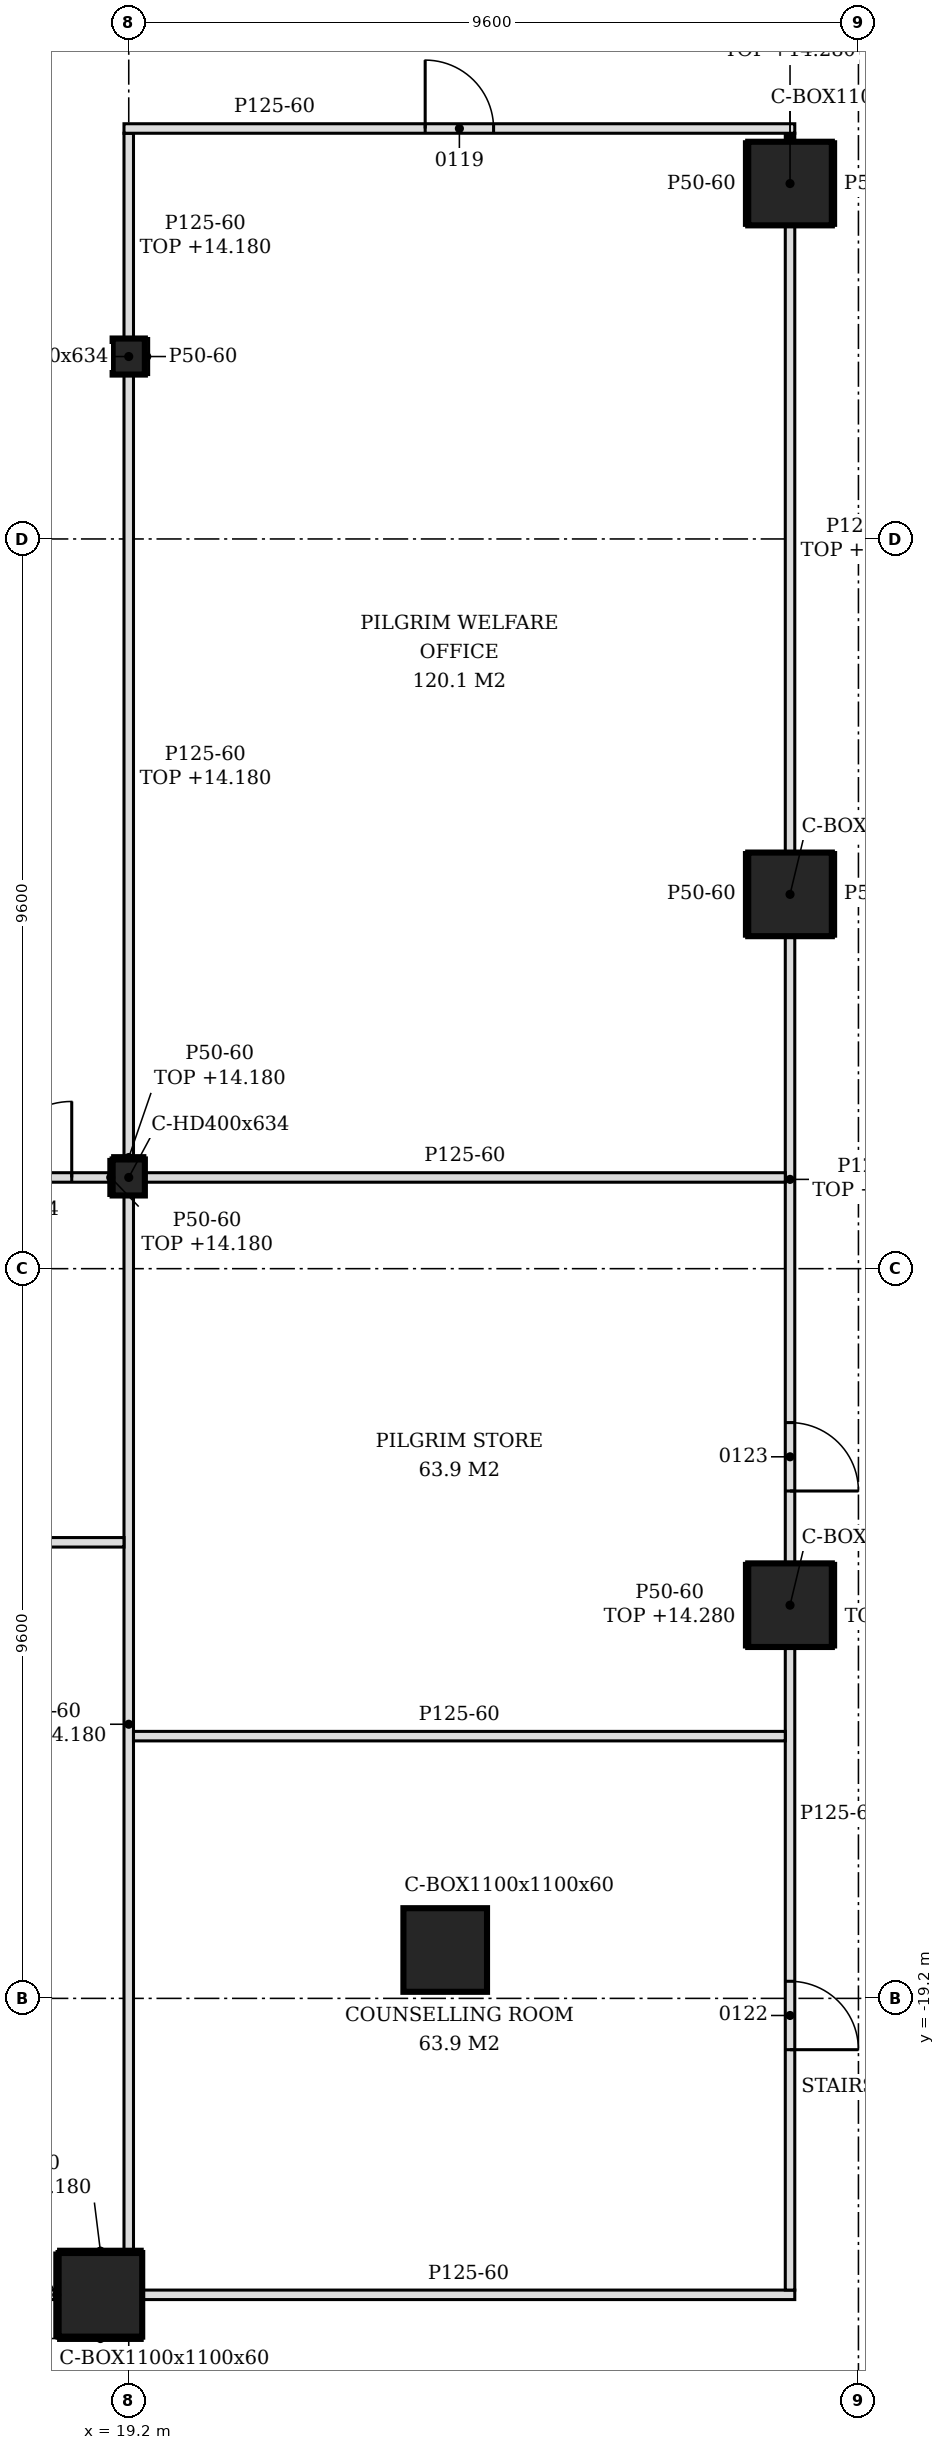
"""IFC4 building model, lengths in metres.
Left out: names, types, materials, properties, quantities, classifications, styles, units other than length and angle.
Written with IfcOpenShell. Run it as: python <this file> out.ifc"""

import sys

from ifc_helpers import new_model, si_unit, direction, frame, frame_2d, origin, origin_2d, place, context, subcontext, project, spatial, polyline, rectangle, hollow_rectangle, i_section, outline, extrude, element, fill, save


model = new_model("IFC4")
c1 = context("Model", 3, precision=1e-05, world=origin(), true_north=direction((0.0, 1.0)))
c2 = subcontext(c1, "Body", "Model", "MODEL_VIEW")
j1 = project(units=[si_unit("LENGTHUNIT", "METRE"), si_unit("PLANEANGLEUNIT", "RADIAN")], contexts=[c1])
p1 = place(None, origin())
s1 = spatial("IfcSite", under=j1, at=p1, CompositionType="ELEMENT")
p2 = place(p1, origin())
s2 = spatial("IfcBuilding", under=s1, at=p2, CompositionType="ELEMENT")
p3 = place(p2, frame((0.0, 0.0, 9.0)))
s3 = spatial("IfcBuildingStorey", under=s2, at=p3, CompositionType="ELEMENT", Elevation=9.0)
for number, where, z_axis, x_axis in (
    (1, (18.827, -23.1, -0.2), (0.0, 0.0, 1.0), (1.0, 0.0, 0.0)),
    (2, (23.364, -18.564, -0.2), (0.0, 0.0, 1.0), (1.0, 0.0, 0.0)),
    (3, (27.9, -14.027, -0.2), (0.0, 0.0, 1.0), (1.0, 0.0, 0.0)),
    (4, (27.9, -4.676, -0.2), (0.0, 0.0, 1.0), (1.0, 0.0, 0.0)),
    (5, (27.9, 4.676, -0.2), (0.0, 0.0, 1.0), (1.0, 0.0, 0.0)),
):
    element("IfcColumn", number, at=place(p3, frame(where, z_axis=z_axis, x_axis=x_axis)), inside=s3, PredefinedType="COLUMN", context=c2, shape_type="SweptSolid", body=[
        extrude(hollow_rectangle(XDim=1.1, YDim=1.1, WallThickness=0.06, at=origin_2d()), origin(), (0.0, 0.0, 1.0), 6.0),
    ])
for number, where, z_axis, x_axis in (
    (6, (19.2, -8.4, -0.2), (0.0, 0.0, 1.0), (1.0, 0.0, 0.0)),
    (7, (19.2, 2.4, -0.2), (0.0, 0.0, 1.0), (1.0, 0.0, 0.0)),
):
    element("IfcColumn", number, at=place(p3, frame(where, z_axis=z_axis, x_axis=x_axis)), inside=s3, PredefinedType="COLUMN", context=c2, shape_type="SweptSolid", body=[
        extrude(i_section(OverallWidth=0.424, OverallDepth=0.474, WebThickness=0.048, FlangeThickness=0.077, FilletRadius=0.015, at=origin_2d()), origin(), (0.0, 0.0, 1.0), 6.0),
    ])
p4 = place(p3, frame((9.964, -23.1, 0.0), z_axis=(0.0, 0.0, 1.0), x_axis=(1.0, 0.0, 0.0)))
e8 = element("IfcWall", 8, at=p4, inside=s3, PredefinedType="PARTITIONING", context=c2, shape_type="SweptSolid", body=[
    extrude(rectangle(XDim=8.313, YDim=0.125, at=frame_2d((4.157, 0.0))), origin(), (0.0, 0.0, 1.0), 5.28),
])
p5 = place(p4, frame((3.986, 0.0, 0.0)))
e9 = element("IfcOpeningElement", 9, at=p5, cuts=e8, PredefinedType="OPENING", context=c2, shape_type="SweptSolid", body=[
    extrude(rectangle(XDim=0.9, YDim=2.1, at=frame_2d((0.45, 1.05))), frame((0.0, 0.073, 0.0), z_axis=(0.0, -1.0, 0.0), x_axis=(1.0, 0.0, 0.0)), (0.0, 0.0, 1.0), 0.145),
])
p6 = place(p3, frame((19.377, -23.1, 0.0), z_axis=(0.0, 0.0, 1.0), x_axis=(1.0, 0.0, 0.0)))
e10 = element("IfcWall", 10, at=p6, inside=s3, PredefinedType="PARTITIONING", context=c2, shape_type="SweptSolid", body=[
    extrude(rectangle(XDim=8.585, YDim=0.125, at=frame_2d((4.292, 0.0))), origin(), (0.0, 0.0, 1.0), 5.8),
])
p7 = place(p3, frame((27.9, -23.038, 0.0), z_axis=(0.0, 0.0, 1.0), x_axis=(0.0, 1.0, 0.0)))
e11 = element("IfcWall", 11, at=p7, inside=s3, PredefinedType="PARTITIONING", context=c2, shape_type="SweptSolid", body=[
    extrude(outline(polyline([(0.0, 0.0), (8.46, 0.0), (8.46, 5.8), (3.927, 5.8), (3.926, 5.38), (3.748, 5.38), (3.746, 5.8), (0.0, 5.8), (0.0, 0.0)])), frame((0.0, 0.062, 0.0), z_axis=(0.0, -1.0, 0.0), x_axis=(1.0, 0.0, 0.0)), (0.0, 0.0, 1.0), 0.125),
])
p8 = place(p7, frame((3.163, 0.0, 0.0)))
e12 = element("IfcOpeningElement", 12, at=p8, cuts=e11, PredefinedType="OPENING", context=c2, shape_type="SweptSolid", body=[
    extrude(rectangle(XDim=0.9, YDim=2.1, at=frame_2d((0.45, 1.05))), frame((0.0, 0.073, 0.0), z_axis=(0.0, -1.0, 0.0), x_axis=(1.0, 0.0, 0.0)), (0.0, 0.0, 1.0), 0.145),
])
p9 = place(p3, frame((19.2, -22.55, 0.0), z_axis=(0.0, 0.0, 1.0), x_axis=(0.0, 1.0, 0.0)))
e13 = element("IfcWall", 13, at=p9, inside=s3, PredefinedType="PARTITIONING", context=c2, shape_type="SweptSolid", body=[
    extrude(rectangle(XDim=13.913, YDim=0.125, at=frame_2d((6.957, 0.0))), origin(), (0.0, 0.0, 1.0), 5.18),
])
p10 = place(p3, frame((19.262, -15.75, 0.0), z_axis=(0.0, 0.0, 1.0), x_axis=(1.0, 0.0, 0.0)))
e14 = element("IfcWall", 14, at=p10, inside=s3, PredefinedType="PARTITIONING", context=c2, shape_type="SweptSolid", body=[
    extrude(outline(polyline([(0.0, 0.0), (8.575, 0.0), (8.575, 5.8), (7.189, 5.8), (7.187, 5.28), (6.64, 5.28), (6.638, 5.8), (0.087, 5.8), (0.085, 5.18), (0.0, 5.18), (0.0, 0.0)])), frame((0.0, 0.062, 0.0), z_axis=(0.0, -1.0, 0.0), x_axis=(1.0, 0.0, 0.0)), (0.0, 0.0, 1.0), 0.125),
])
p11 = place(p3, frame((27.9, -13.477, 0.0), z_axis=(0.0, 0.0, 1.0), x_axis=(0.0, 1.0, 0.0)))
e15 = element("IfcWall", 15, at=p11, inside=s3, PredefinedType="PARTITIONING", context=c2, shape_type="SweptSolid", body=[
    extrude(rectangle(XDim=8.252, YDim=0.125, at=frame_2d((4.126, 0.0))), origin(), (0.0, 0.0, 1.0), 5.28),
])
p12 = place(p11, frame((0.952, 0.0, 0.0)))
e16 = element("IfcOpeningElement", 16, at=p12, cuts=e15, PredefinedType="OPENING", context=c2, shape_type="SweptSolid", body=[
    extrude(rectangle(XDim=0.9, YDim=2.1, at=frame_2d((0.45, 1.05))), frame((0.0, 0.073, 0.0), z_axis=(0.0, -1.0, 0.0), x_axis=(1.0, 0.0, 0.0)), (0.0, 0.0, 1.0), 0.145),
])
p13 = place(p3, frame((-4.738, -13.2, 0.0), z_axis=(0.0, 0.0, 1.0), x_axis=(1.0, 0.0, 0.0)))
e17 = element("IfcWall", 17, at=p13, inside=s3, PredefinedType="PARTITIONING", context=c2, shape_type="SweptSolid", body=[
    extrude(outline(polyline([(0.0, 0.0), (23.875, 0.0), (23.875, 5.18), (23.788, 5.18), (23.785, 5.8), (19.288, 5.8), (19.285, 5.18), (18.988, 5.18), (18.986, 5.8), (14.488, 5.8), (14.486, 5.18), (14.188, 5.18), (14.186, 5.8), (9.688, 5.8), (9.686, 5.18), (9.387, 5.18), (9.385, 5.8), (4.887, 5.8), (4.885, 5.18), (4.587, 5.18), (4.585, 5.8), (0.087, 5.8), (0.085, 5.18), (0.0, 5.18), (0.0, 0.0)])), frame((0.0, 0.062, 0.0), z_axis=(0.0, -1.0, 0.0), x_axis=(1.0, 0.0, 0.0)), (0.0, 0.0, 1.0), 0.125),
])
p14 = place(p3, frame((7.412, -8.4, 0.0), z_axis=(0.0, 0.0, 1.0), x_axis=(1.0, 0.0, 0.0)))
e18 = element("IfcWall", 18, at=p14, inside=s3, PredefinedType="PARTITIONING", context=c2, shape_type="SweptSolid", body=[
    extrude(rectangle(XDim=11.576, YDim=0.125, at=frame_2d((5.788, 0.0))), origin(), (0.0, 0.0, 1.0), 5.18),
])
p15 = place(p14, frame((4.138, 0.0, 0.0)))
e19 = element("IfcOpeningElement", 19, at=p15, cuts=e18, PredefinedType="OPENING", context=c2, shape_type="SweptSolid", body=[
    extrude(rectangle(XDim=0.8, YDim=2.1, at=frame_2d((0.4, 1.05))), frame((0.0, 0.073, 0.0), z_axis=(0.0, -1.0, 0.0), x_axis=(1.0, 0.0, 0.0)), (0.0, 0.0, 1.0), 0.145),
])
p16 = place(p14, frame((10.038, 0.0, 0.0)))
e20 = element("IfcOpeningElement", 20, at=p16, cuts=e18, PredefinedType="OPENING", context=c2, shape_type="SweptSolid", body=[
    extrude(rectangle(XDim=1.0, YDim=2.1, at=frame_2d((0.5, 1.05))), frame((0.0, 0.073, 0.0), z_axis=(0.0, -1.0, 0.0), x_axis=(1.0, 0.0, 0.0)), (0.0, 0.0, 1.0), 0.145),
])
p17 = place(p3, frame((19.412, -8.4, 0.0), z_axis=(0.0, 0.0, 1.0), x_axis=(1.0, 0.0, 0.0)))
e21 = element("IfcWall", 21, at=p17, inside=s3, PredefinedType="PARTITIONING", context=c2, shape_type="SweptSolid", body=[
    extrude(outline(polyline([(0.0, 0.0), (8.425, 0.0), (8.426, 5.28), (8.338, 5.28), (8.336, 5.8), (0.0, 5.8), (0.0, 0.0)])), frame((0.0, 0.062, 0.0), z_axis=(0.0, -1.0, 0.0), x_axis=(1.0, 0.0, 0.0)), (0.0, 0.0, 1.0), 0.125),
])
p18 = place(p3, frame((19.2, -8.163, 0.0), z_axis=(0.0, 0.0, 1.0), x_axis=(0.0, 1.0, 0.0)))
e22 = element("IfcWall", 22, at=p18, inside=s3, PredefinedType="PARTITIONING", context=c2, shape_type="SweptSolid", body=[
    extrude(rectangle(XDim=10.326, YDim=0.125, at=frame_2d((5.163, 0.0))), origin(), (0.0, 0.0, 1.0), 5.18),
])
p19 = place(p3, frame((27.9, -4.126, 0.0), z_axis=(0.0, 0.0, 1.0), x_axis=(0.0, 1.0, 0.0)))
e23 = element("IfcWall", 23, at=p19, inside=s3, PredefinedType="PARTITIONING", context=c2, shape_type="SweptSolid", body=[
    extrude(rectangle(XDim=8.251, YDim=0.125, at=frame_2d((4.126, 0.0))), origin(), (0.0, 0.0, 1.0), 5.28),
])
p20 = place(p3, frame((19.2, 2.637, 0.0), z_axis=(0.0, 0.0, 1.0), x_axis=(0.0, 1.0, 0.0)))
e24 = element("IfcWall", 24, at=p20, inside=s3, PredefinedType="PARTITIONING", context=c2, shape_type="SweptSolid", body=[
    extrude(rectangle(XDim=2.7, YDim=0.125, at=frame_2d((1.35, 0.0))), origin(), (0.0, 0.0, 1.0), 5.18),
])
p21 = place(p3, frame((27.9, 5.226, 0.0), z_axis=(0.0, 0.0, 1.0), x_axis=(0.0, 1.0, 0.0)))
e25 = element("IfcWall", 25, at=p21, inside=s3, PredefinedType="PARTITIONING", context=c2, shape_type="SweptSolid", body=[
    extrude(rectangle(XDim=0.112, YDim=0.125, at=frame_2d((0.056, 0.0))), origin(), (0.0, 0.0, 1.0), 5.28),
])
p22 = place(p3, frame((19.137, 5.4, 0.0), z_axis=(0.0, 0.0, 1.0), x_axis=(1.0, 0.0, 0.0)))
e26 = element("IfcWall", 26, at=p22, inside=s3, PredefinedType="PARTITIONING", context=c2, shape_type="SweptSolid", body=[
    extrude(outline(polyline([(0.0, 0.0), (8.825, 0.0), (8.825, 5.28), (8.613, 5.28), (8.611, 5.8), (4.962, 5.8), (4.96, 5.28), (4.762, 5.28), (4.76, 5.8), (0.212, 5.8), (0.21, 5.18), (0.0, 5.18), (0.0, 0.0)])), frame((0.0, 0.062, 0.0), z_axis=(0.0, -1.0, 0.0), x_axis=(1.0, 0.0, 0.0)), (0.0, 0.0, 1.0), 0.125),
])
p23 = place(p22, frame((3.962, 0.0, 0.0)))
e27 = element("IfcOpeningElement", 27, at=p23, cuts=e26, PredefinedType="OPENING", context=c2, shape_type="SweptSolid", body=[
    extrude(rectangle(XDim=0.9, YDim=2.1, at=frame_2d((0.45, 1.05))), frame((0.0, 0.073, 0.0), z_axis=(0.0, -1.0, 0.0), x_axis=(1.0, 0.0, 0.0)), (0.0, 0.0, 1.0), 0.145),
])
p24 = place(p3, frame((18.277, -22.525, 0.0), z_axis=(0.0, 0.0, 1.0), x_axis=(1.0, 0.0, 0.0)))
e28 = element("IfcWall", 28, at=p24, inside=s3, PredefinedType="PARTITIONING", context=c2, shape_type="SweptSolid", body=[
    extrude(rectangle(XDim=1.1, YDim=0.05, at=frame_2d((0.55, 0.0))), origin(), (0.0, 0.0, 1.0), 5.18),
])
p25 = place(p3, frame((18.277, -23.675, 0.0), z_axis=(0.0, 0.0, 1.0), x_axis=(1.0, 0.0, 0.0)))
e29 = element("IfcWall", 29, at=p25, inside=s3, PredefinedType="PARTITIONING", context=c2, shape_type="SweptSolid", body=[
    extrude(rectangle(XDim=1.1, YDim=0.05, at=frame_2d((0.55, 0.0))), origin(), (0.0, 0.0, 1.0), 5.42),
])
p26 = place(p3, frame((18.252, -23.65, 0.0), z_axis=(0.0, 0.0, 1.0), x_axis=(0.0, 1.0, 0.0)))
e30 = element("IfcWall", 30, at=p26, inside=s3, PredefinedType="PARTITIONING", context=c2, shape_type="SweptSolid", body=[
    extrude(rectangle(XDim=1.1, YDim=0.05, at=frame_2d((0.55, 0.0))), origin(), (0.0, 0.0, 1.0), 5.28),
])
p27 = place(p3, frame((18.963, -8.637, 0.0), z_axis=(0.0, 0.0, 1.0), x_axis=(0.0, 1.0, 0.0)))
e31 = element("IfcWall", 31, at=p27, inside=s3, PredefinedType="PARTITIONING", context=c2, shape_type="SweptSolid", body=[
    extrude(rectangle(XDim=0.474, YDim=0.05, at=frame_2d((0.237, 0.0))), origin(), (0.0, 0.0, 1.0), 5.18),
])
for number, where, z_axis, x_axis in (
    (32, (27.325, -14.577, 0.0), (0.0, 0.0, 1.0), (0.0, 1.0, 0.0)),
    (33, (28.475, -14.577, 0.0), (0.0, 0.0, 1.0), (0.0, 1.0, 0.0)),
):
    element("IfcWall", number, at=place(p3, frame(where, z_axis=z_axis, x_axis=x_axis)), inside=s3, PredefinedType="PARTITIONING", context=c2, shape_type="SweptSolid", body=[
        extrude(rectangle(XDim=1.1, YDim=0.05, at=frame_2d((0.55, 0.0))), origin(), (0.0, 0.0, 1.0), 5.28),
    ])
for number, where, z_axis, x_axis in (
    (34, (27.325, -5.226, 0.0), (0.0, 0.0, 1.0), (0.0, 1.0, 0.0)),
    (35, (28.475, -5.226, 0.0), (0.0, 0.0, 1.0), (0.0, 1.0, 0.0)),
    (36, (27.325, 4.126, 0.0), (0.0, 0.0, 1.0), (0.0, 1.0, 0.0)),
    (37, (28.475, 4.126, 0.0), (0.0, 0.0, 1.0), (0.0, 1.0, 0.0)),
):
    element("IfcWall", number, at=place(p3, frame(where, z_axis=z_axis, x_axis=x_axis)), inside=s3, PredefinedType="PARTITIONING", context=c2, shape_type="SweptSolid", body=[
        extrude(rectangle(XDim=1.1, YDim=0.05, at=frame_2d((0.55, 0.0))), origin(), (0.0, 0.0, 1.0), 5.8),
    ])
p28 = place(p3, frame((18.988, -8.138, 0.0), z_axis=(0.0, 0.0, 1.0), x_axis=(1.0, 0.0, 0.0)))
e38 = element("IfcWall", 38, at=p28, inside=s3, PredefinedType="PARTITIONING", context=c2, shape_type="SweptSolid", body=[
    extrude(rectangle(XDim=0.424, YDim=0.05, at=frame_2d((0.212, 0.0))), origin(), (0.0, 0.0, 1.0), 5.18),
])
p29 = place(p3, frame((19.437, 2.163, 0.0), z_axis=(0.0, 0.0, 1.0), x_axis=(0.0, 1.0, 0.0)))
e39 = element("IfcWall", 39, at=p29, inside=s3, PredefinedType="PARTITIONING", context=c2, shape_type="SweptSolid", body=[
    extrude(rectangle(XDim=0.474, YDim=0.05, at=frame_2d((0.237, 0.0))), origin(), (0.0, 0.0, 1.0), 5.8),
])
p30 = place(p16, origin())
e40 = element("IfcDoor", 40, at=p30, inside=s3, OperationType="SINGLE_SWING_RIGHT", PredefinedType="DOOR", context=c2, shape_type="SweptSolid", body=[
    extrude(rectangle(XDim=1.0, YDim=2.1, at=frame_2d((0.5, 1.05))), frame((0.0, 0.025, 0.0), z_axis=(0.0, -1.0, 0.0), x_axis=(1.0, 0.0, 0.0)), (0.0, 0.0, 1.0), 0.05),
])
fill(e20, e40)
p31 = place(p23, origin())
e41 = element("IfcDoor", 41, at=p31, inside=s3, OperationType="SINGLE_SWING_LEFT", PredefinedType="DOOR", context=c2, shape_type="SweptSolid", body=[
    extrude(rectangle(XDim=0.9, YDim=2.1, at=frame_2d((0.45, 1.05))), frame((0.0, 0.025, 0.0), z_axis=(0.0, -1.0, 0.0), x_axis=(1.0, 0.0, 0.0)), (0.0, 0.0, 1.0), 0.05),
])
fill(e27, e41)
p32 = place(p8, frame((0.9, 0.0, 0.0), z_axis=(0.0, 0.0, 1.0), x_axis=(-1.0, 0.0, 0.0)))
e42 = element("IfcDoor", 42, at=p32, inside=s3, OperationType="SINGLE_SWING_RIGHT", PredefinedType="DOOR", context=c2, shape_type="SweptSolid", body=[
    extrude(rectangle(XDim=0.9, YDim=2.1, at=frame_2d((0.45, 1.05))), frame((0.0, 0.025, 0.0), z_axis=(0.0, -1.0, 0.0), x_axis=(1.0, 0.0, 0.0)), (0.0, 0.0, 1.0), 0.05),
])
fill(e12, e42)
p33 = place(p12, frame((0.9, 0.0, 0.0), z_axis=(0.0, 0.0, 1.0), x_axis=(-1.0, 0.0, 0.0)))
e43 = element("IfcDoor", 43, at=p33, inside=s3, OperationType="SINGLE_SWING_RIGHT", PredefinedType="DOOR", context=c2, shape_type="SweptSolid", body=[
    extrude(rectangle(XDim=0.9, YDim=2.1, at=frame_2d((0.45, 1.05))), frame((0.0, 0.025, 0.0), z_axis=(0.0, -1.0, 0.0), x_axis=(1.0, 0.0, 0.0)), (0.0, 0.0, 1.0), 0.05),
])
fill(e16, e43)
save(model, sys.argv[1])
